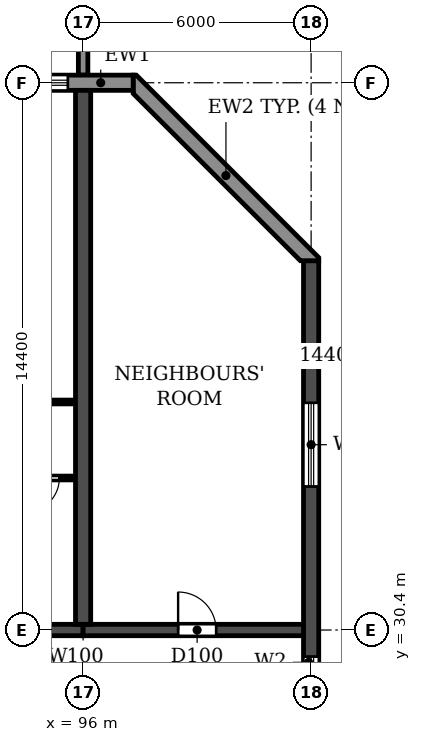
"""IFC4 building model, lengths in metres.
Left out: names, types, materials, properties, quantities, classifications, styles, units other than length and angle.
Written with IfcOpenShell. Run it as: python <this file> out.ifc"""

import sys

from ifc_helpers import new_model, si_unit, direction, frame, frame_2d, origin, place, context, subcontext, project, spatial, polyline, rectangle, outline, extrude, source, transform, mapped, element, fill, save


model = new_model("IFC4")
c1 = context("Model", 3, precision=1e-05, world=origin(), true_north=direction((0.0, 1.0)))
c2 = subcontext(c1, "Body", "Model", "MODEL_VIEW")
j1 = project(units=[si_unit("LENGTHUNIT", "METRE"), si_unit("PLANEANGLEUNIT", "RADIAN")], contexts=[c1])
p1 = place(None, origin())
s1 = spatial("IfcSite", under=j1, at=p1, CompositionType="ELEMENT")
p2 = place(p1, origin())
s2 = spatial("IfcBuilding", under=s1, at=p2, CompositionType="ELEMENT")
p3 = place(p2, frame((0.0, 0.0, 26.7)))
s3 = spatial("IfcBuildingStorey", under=s2, at=p3, CompositionType="ELEMENT", Elevation=26.7)
p4 = place(p3, frame((96.0, 30.55, 0.0), z_axis=(0.0, 0.0, 1.0), x_axis=(0.0, 1.0, 0.0)))
e1 = element("IfcWall", 1, at=p4, inside=s3, PredefinedType="SHEAR", context=c2, shape_type="SweptSolid", body=[
    extrude(rectangle(XDim=14.05, YDim=0.4, at=frame_2d((7.025, 0.0))), origin(), (0.0, 0.0, 1.0), 3.05),
])
p5 = place(p3, frame((102.0, 4.683, 0.0), z_axis=(0.0, 0.0, 1.0), x_axis=(0.0, 1.0, 0.0)))
e2 = element("IfcWall", 2, at=p5, inside=s3, PredefinedType="SHEAR", context=c2, shape_type="SweptSolid", body=[
    extrude(rectangle(XDim=35.434, YDim=0.4, at=frame_2d((17.717, 0.0))), origin(), (0.0, 0.0, 1.0), 3.05),
])
p6 = place(p5, frame((15.917, 0.0, 0.9)))
e3 = element("IfcOpeningElement", 3, at=p6, cuts=e2, PredefinedType="OPENING", context=c2, shape_type="SweptSolid", body=[
    extrude(rectangle(XDim=1.2, YDim=1.5, at=frame_2d((0.6, 0.75))), frame((0.0, 0.21, 0.0), z_axis=(0.0, -1.0, 0.0), x_axis=(1.0, 0.0, 0.0)), (0.0, 0.0, 1.0), 0.42),
])
p7 = place(p5, frame((23.817, 0.0, 0.9)))
e4 = element("IfcOpeningElement", 4, at=p7, cuts=e2, PredefinedType="OPENING", context=c2, shape_type="SweptSolid", body=[
    extrude(rectangle(XDim=1.2, YDim=1.5, at=frame_2d((0.6, 0.75))), frame((0.0, 0.21, 0.0), z_axis=(0.0, -1.0, 0.0), x_axis=(1.0, 0.0, 0.0)), (0.0, 0.0, 1.0), 0.42),
])
p8 = place(p5, frame((8.017, 0.0, 0.9)))
e5 = element("IfcOpeningElement", 5, at=p8, cuts=e2, PredefinedType="OPENING", context=c2, shape_type="SweptSolid", body=[
    extrude(rectangle(XDim=1.2, YDim=1.5, at=frame_2d((0.6, 0.75))), frame((0.0, 0.21, 0.0), z_axis=(0.0, -1.0, 0.0), x_axis=(1.0, 0.0, 0.0)), (0.0, 0.0, 1.0), 0.42),
])
p9 = place(p5, frame((29.493, 0.0, 0.6)))
e6 = element("IfcOpeningElement", 6, at=p9, cuts=e2, PredefinedType="OPENING", context=c2, shape_type="SweptSolid", body=[
    extrude(rectangle(XDim=2.2, YDim=1.8, at=frame_2d((1.1, 0.9))), frame((0.0, 0.21, 0.0), z_axis=(0.0, -1.0, 0.0), x_axis=(1.0, 0.0, 0.0)), (0.0, 0.0, 1.0), 0.42),
])
p10 = place(p5, frame((2.541, 0.0, 0.6)))
e7 = element("IfcOpeningElement", 7, at=p10, cuts=e2, PredefinedType="OPENING", context=c2, shape_type="SweptSolid", body=[
    extrude(rectangle(XDim=2.2, YDim=1.8, at=frame_2d((1.1, 0.9))), frame((0.0, 0.21, 0.0), z_axis=(0.0, -1.0, 0.0), x_axis=(1.0, 0.0, 0.0)), (0.0, 0.0, 1.0), 0.42),
])
p11 = place(p3, frame((90.0, 30.4, 0.0), z_axis=(0.0, 0.0, 1.0), x_axis=(1.0, 0.0, 0.0)))
e8 = element("IfcWall", 8, at=p11, inside=s3, PredefinedType="SHEAR", context=c2, shape_type="SweptSolid", body=[
    extrude(rectangle(XDim=6.0, YDim=0.3, at=frame_2d((3.0, 0.0))), origin(), (0.0, 0.0, 1.0), 2.45),
])
p12 = place(p11, frame((2.45, 0.0, 0.0)))
e9 = element("IfcOpeningElement", 9, at=p12, cuts=e8, PredefinedType="OPENING", context=c2, shape_type="SweptSolid", body=[
    extrude(rectangle(XDim=1.0, YDim=2.1, at=frame_2d((0.5, 1.05))), frame((0.0, 0.16, 0.0), z_axis=(0.0, -1.0, 0.0), x_axis=(1.0, 0.0, 0.0)), (0.0, 0.0, 1.0), 0.32),
])
p13 = place(p3, frame((96.0, 30.4, 0.0), z_axis=(0.0, 0.0, 1.0), x_axis=(1.0, 0.0, 0.0)))
e10 = element("IfcWall", 10, at=p13, inside=s3, PredefinedType="SHEAR", context=c2, shape_type="SweptSolid", body=[
    extrude(rectangle(XDim=5.8, YDim=0.3, at=frame_2d((2.9, 0.0))), origin(), (0.0, 0.0, 1.0), 2.45),
])
p14 = place(p13, frame((2.5, 0.0, 0.0)))
e11 = element("IfcOpeningElement", 11, at=p14, cuts=e10, PredefinedType="OPENING", context=c2, shape_type="SweptSolid", body=[
    extrude(rectangle(XDim=1.0, YDim=2.1, at=frame_2d((0.5, 1.05))), frame((0.0, 0.16, 0.0), z_axis=(0.0, -1.0, 0.0), x_axis=(1.0, 0.0, 0.0)), (0.0, 0.0, 1.0), 0.32),
])
p15 = place(p3, origin())
e12 = element("IfcWall", 12, at=p15, inside=s3, PredefinedType="STANDARD", context=c2, shape_type="SweptSolid", body=[
    extrude(outline(polyline([(102.2, 40.117), (102.2, 40.2), (97.4, 45.0), (97.317, 45.0), (97.317, 44.517), (101.717, 40.117), (102.2, 40.117)])), origin(), (0.0, 0.0, 1.0), 3.05),
])
p16 = place(p3, frame((97.317, 44.8, 0.0), z_axis=(0.0, 0.0, 1.0), x_axis=(-1.0, 0.0, 0.0)))
e13 = element("IfcWall", 13, at=p16, inside=s3, PredefinedType="STANDARD", context=c2, shape_type="SweptSolid", body=[
    extrude(rectangle(XDim=92.634, YDim=0.4, at=frame_2d((46.317, 0.0))), origin(), (0.0, 0.0, 1.0), 3.05),
])
p17 = place(p16, frame((88.717, 0.0, 0.9)))
e14 = element("IfcOpeningElement", 14, at=p17, cuts=e13, PredefinedType="OPENING", context=c2, shape_type="SweptSolid", body=[
    extrude(rectangle(XDim=2.2, YDim=1.5, at=frame_2d((1.1, 0.75))), frame((0.0, 0.21, 0.0), z_axis=(0.0, -1.0, 0.0), x_axis=(1.0, 0.0, 0.0)), (0.0, 0.0, 1.0), 0.42),
])
p18 = place(p16, frame((85.917, 0.0, 0.0)))
e15 = element("IfcOpeningElement", 15, at=p18, cuts=e13, PredefinedType="OPENING", context=c2, shape_type="SweptSolid", body=[
    extrude(rectangle(XDim=1.8, YDim=2.4, at=frame_2d((0.9, 1.2))), frame((0.0, 0.21, 0.0), z_axis=(0.0, -1.0, 0.0), x_axis=(1.0, 0.0, 0.0)), (0.0, 0.0, 1.0), 0.42),
])
p19 = place(p16, frame((82.717, 0.0, 0.9)))
e16 = element("IfcOpeningElement", 16, at=p19, cuts=e13, PredefinedType="OPENING", context=c2, shape_type="SweptSolid", body=[
    extrude(rectangle(XDim=2.2, YDim=1.5, at=frame_2d((1.1, 0.75))), frame((0.0, 0.21, 0.0), z_axis=(0.0, -1.0, 0.0), x_axis=(1.0, 0.0, 0.0)), (0.0, 0.0, 1.0), 0.42),
])
p20 = place(p16, frame((79.717, 0.0, 0.9)))
e17 = element("IfcOpeningElement", 17, at=p20, cuts=e13, PredefinedType="OPENING", context=c2, shape_type="SweptSolid", body=[
    extrude(rectangle(XDim=2.2, YDim=1.5, at=frame_2d((1.1, 0.75))), frame((0.0, 0.21, 0.0), z_axis=(0.0, -1.0, 0.0), x_axis=(1.0, 0.0, 0.0)), (0.0, 0.0, 1.0), 0.42),
])
p21 = place(p16, frame((76.917, 0.0, 0.0)))
e18 = element("IfcOpeningElement", 18, at=p21, cuts=e13, PredefinedType="OPENING", context=c2, shape_type="SweptSolid", body=[
    extrude(rectangle(XDim=1.8, YDim=2.4, at=frame_2d((0.9, 1.2))), frame((0.0, 0.21, 0.0), z_axis=(0.0, -1.0, 0.0), x_axis=(1.0, 0.0, 0.0)), (0.0, 0.0, 1.0), 0.42),
])
p22 = place(p16, frame((73.717, 0.0, 0.9)))
e19 = element("IfcOpeningElement", 19, at=p22, cuts=e13, PredefinedType="OPENING", context=c2, shape_type="SweptSolid", body=[
    extrude(rectangle(XDim=2.2, YDim=1.5, at=frame_2d((1.1, 0.75))), frame((0.0, 0.21, 0.0), z_axis=(0.0, -1.0, 0.0), x_axis=(1.0, 0.0, 0.0)), (0.0, 0.0, 1.0), 0.42),
])
p23 = place(p16, frame((70.717, 0.0, 0.9)))
e20 = element("IfcOpeningElement", 20, at=p23, cuts=e13, PredefinedType="OPENING", context=c2, shape_type="SweptSolid", body=[
    extrude(rectangle(XDim=2.2, YDim=1.5, at=frame_2d((1.1, 0.75))), frame((0.0, 0.21, 0.0), z_axis=(0.0, -1.0, 0.0), x_axis=(1.0, 0.0, 0.0)), (0.0, 0.0, 1.0), 0.42),
])
p24 = place(p16, frame((67.717, 0.0, 0.9)))
e21 = element("IfcOpeningElement", 21, at=p24, cuts=e13, PredefinedType="OPENING", context=c2, shape_type="SweptSolid", body=[
    extrude(rectangle(XDim=2.2, YDim=1.5, at=frame_2d((1.1, 0.75))), frame((0.0, 0.21, 0.0), z_axis=(0.0, -1.0, 0.0), x_axis=(1.0, 0.0, 0.0)), (0.0, 0.0, 1.0), 0.42),
])
p25 = place(p16, frame((64.917, 0.0, 0.0)))
e22 = element("IfcOpeningElement", 22, at=p25, cuts=e13, PredefinedType="OPENING", context=c2, shape_type="SweptSolid", body=[
    extrude(rectangle(XDim=1.8, YDim=2.4, at=frame_2d((0.9, 1.2))), frame((0.0, 0.21, 0.0), z_axis=(0.0, -1.0, 0.0), x_axis=(1.0, 0.0, 0.0)), (0.0, 0.0, 1.0), 0.42),
])
p26 = place(p16, frame((61.717, 0.0, 0.9)))
e23 = element("IfcOpeningElement", 23, at=p26, cuts=e13, PredefinedType="OPENING", context=c2, shape_type="SweptSolid", body=[
    extrude(rectangle(XDim=2.2, YDim=1.5, at=frame_2d((1.1, 0.75))), frame((0.0, 0.21, 0.0), z_axis=(0.0, -1.0, 0.0), x_axis=(1.0, 0.0, 0.0)), (0.0, 0.0, 1.0), 0.42),
])
p27 = place(p16, frame((58.717, 0.0, 0.9)))
e24 = element("IfcOpeningElement", 24, at=p27, cuts=e13, PredefinedType="OPENING", context=c2, shape_type="SweptSolid", body=[
    extrude(rectangle(XDim=2.2, YDim=1.5, at=frame_2d((1.1, 0.75))), frame((0.0, 0.21, 0.0), z_axis=(0.0, -1.0, 0.0), x_axis=(1.0, 0.0, 0.0)), (0.0, 0.0, 1.0), 0.42),
])
p28 = place(p16, frame((55.917, 0.0, 0.0)))
e25 = element("IfcOpeningElement", 25, at=p28, cuts=e13, PredefinedType="OPENING", context=c2, shape_type="SweptSolid", body=[
    extrude(rectangle(XDim=1.8, YDim=2.4, at=frame_2d((0.9, 1.2))), frame((0.0, 0.21, 0.0), z_axis=(0.0, -1.0, 0.0), x_axis=(1.0, 0.0, 0.0)), (0.0, 0.0, 1.0), 0.42),
])
p29 = place(p16, frame((52.917, 0.0, 0.0)))
e26 = element("IfcOpeningElement", 26, at=p29, cuts=e13, PredefinedType="OPENING", context=c2, shape_type="SweptSolid", body=[
    extrude(rectangle(XDim=1.8, YDim=2.4, at=frame_2d((0.9, 1.2))), frame((0.0, 0.21, 0.0), z_axis=(0.0, -1.0, 0.0), x_axis=(1.0, 0.0, 0.0)), (0.0, 0.0, 1.0), 0.42),
])
p30 = place(p16, frame((49.717, 0.0, 0.9)))
e27 = element("IfcOpeningElement", 27, at=p30, cuts=e13, PredefinedType="OPENING", context=c2, shape_type="SweptSolid", body=[
    extrude(rectangle(XDim=2.2, YDim=1.5, at=frame_2d((1.1, 0.75))), frame((0.0, 0.21, 0.0), z_axis=(0.0, -1.0, 0.0), x_axis=(1.0, 0.0, 0.0)), (0.0, 0.0, 1.0), 0.42),
])
p31 = place(p16, frame((46.917, 0.0, 0.0)))
e28 = element("IfcOpeningElement", 28, at=p31, cuts=e13, PredefinedType="OPENING", context=c2, shape_type="SweptSolid", body=[
    extrude(rectangle(XDim=1.8, YDim=2.4, at=frame_2d((0.9, 1.2))), frame((0.0, 0.21, 0.0), z_axis=(0.0, -1.0, 0.0), x_axis=(1.0, 0.0, 0.0)), (0.0, 0.0, 1.0), 0.42),
])
p32 = place(p16, frame((43.717, 0.0, 0.9)))
e29 = element("IfcOpeningElement", 29, at=p32, cuts=e13, PredefinedType="OPENING", context=c2, shape_type="SweptSolid", body=[
    extrude(rectangle(XDim=2.2, YDim=1.5, at=frame_2d((1.1, 0.75))), frame((0.0, 0.21, 0.0), z_axis=(0.0, -1.0, 0.0), x_axis=(1.0, 0.0, 0.0)), (0.0, 0.0, 1.0), 0.42),
])
p33 = place(p16, frame((40.717, 0.0, 0.9)))
e30 = element("IfcOpeningElement", 30, at=p33, cuts=e13, PredefinedType="OPENING", context=c2, shape_type="SweptSolid", body=[
    extrude(rectangle(XDim=2.2, YDim=1.5, at=frame_2d((1.1, 0.75))), frame((0.0, 0.21, 0.0), z_axis=(0.0, -1.0, 0.0), x_axis=(1.0, 0.0, 0.0)), (0.0, 0.0, 1.0), 0.42),
])
p34 = place(p16, frame((37.917, 0.0, 0.0)))
e31 = element("IfcOpeningElement", 31, at=p34, cuts=e13, PredefinedType="OPENING", context=c2, shape_type="SweptSolid", body=[
    extrude(rectangle(XDim=1.8, YDim=2.4, at=frame_2d((0.9, 1.2))), frame((0.0, 0.21, 0.0), z_axis=(0.0, -1.0, 0.0), x_axis=(1.0, 0.0, 0.0)), (0.0, 0.0, 1.0), 0.42),
])
p35 = place(p16, frame((34.917, 0.0, 0.0)))
e32 = element("IfcOpeningElement", 32, at=p35, cuts=e13, PredefinedType="OPENING", context=c2, shape_type="SweptSolid", body=[
    extrude(rectangle(XDim=1.8, YDim=2.4, at=frame_2d((0.9, 1.2))), frame((0.0, 0.21, 0.0), z_axis=(0.0, -1.0, 0.0), x_axis=(1.0, 0.0, 0.0)), (0.0, 0.0, 1.0), 0.42),
])
p36 = place(p16, frame((31.717, 0.0, 0.9)))
e33 = element("IfcOpeningElement", 33, at=p36, cuts=e13, PredefinedType="OPENING", context=c2, shape_type="SweptSolid", body=[
    extrude(rectangle(XDim=2.2, YDim=1.5, at=frame_2d((1.1, 0.75))), frame((0.0, 0.21, 0.0), z_axis=(0.0, -1.0, 0.0), x_axis=(1.0, 0.0, 0.0)), (0.0, 0.0, 1.0), 0.42),
])
p37 = place(p16, frame((28.717, 0.0, 0.9)))
e34 = element("IfcOpeningElement", 34, at=p37, cuts=e13, PredefinedType="OPENING", context=c2, shape_type="SweptSolid", body=[
    extrude(rectangle(XDim=2.2, YDim=1.5, at=frame_2d((1.1, 0.75))), frame((0.0, 0.21, 0.0), z_axis=(0.0, -1.0, 0.0), x_axis=(1.0, 0.0, 0.0)), (0.0, 0.0, 1.0), 0.42),
])
p38 = place(p16, frame((25.717, 0.0, 0.9)))
e35 = element("IfcOpeningElement", 35, at=p38, cuts=e13, PredefinedType="OPENING", context=c2, shape_type="SweptSolid", body=[
    extrude(rectangle(XDim=2.2, YDim=1.5, at=frame_2d((1.1, 0.75))), frame((0.0, 0.21, 0.0), z_axis=(0.0, -1.0, 0.0), x_axis=(1.0, 0.0, 0.0)), (0.0, 0.0, 1.0), 0.42),
])
p39 = place(p16, frame((22.717, 0.0, 0.9)))
e36 = element("IfcOpeningElement", 36, at=p39, cuts=e13, PredefinedType="OPENING", context=c2, shape_type="SweptSolid", body=[
    extrude(rectangle(XDim=2.2, YDim=1.5, at=frame_2d((1.1, 0.75))), frame((0.0, 0.21, 0.0), z_axis=(0.0, -1.0, 0.0), x_axis=(1.0, 0.0, 0.0)), (0.0, 0.0, 1.0), 0.42),
])
p40 = place(p16, frame((19.917, 0.0, 0.0)))
e37 = element("IfcOpeningElement", 37, at=p40, cuts=e13, PredefinedType="OPENING", context=c2, shape_type="SweptSolid", body=[
    extrude(rectangle(XDim=1.8, YDim=2.4, at=frame_2d((0.9, 1.2))), frame((0.0, 0.21, 0.0), z_axis=(0.0, -1.0, 0.0), x_axis=(1.0, 0.0, 0.0)), (0.0, 0.0, 1.0), 0.42),
])
p41 = place(p16, frame((16.717, 0.0, 0.9)))
e38 = element("IfcOpeningElement", 38, at=p41, cuts=e13, PredefinedType="OPENING", context=c2, shape_type="SweptSolid", body=[
    extrude(rectangle(XDim=2.2, YDim=1.5, at=frame_2d((1.1, 0.75))), frame((0.0, 0.21, 0.0), z_axis=(0.0, -1.0, 0.0), x_axis=(1.0, 0.0, 0.0)), (0.0, 0.0, 1.0), 0.42),
])
p42 = place(p16, frame((13.717, 0.0, 0.9)))
e39 = element("IfcOpeningElement", 39, at=p42, cuts=e13, PredefinedType="OPENING", context=c2, shape_type="SweptSolid", body=[
    extrude(rectangle(XDim=2.2, YDim=1.5, at=frame_2d((1.1, 0.75))), frame((0.0, 0.21, 0.0), z_axis=(0.0, -1.0, 0.0), x_axis=(1.0, 0.0, 0.0)), (0.0, 0.0, 1.0), 0.42),
])
p43 = place(p16, frame((10.717, 0.0, 0.9)))
e40 = element("IfcOpeningElement", 40, at=p43, cuts=e13, PredefinedType="OPENING", context=c2, shape_type="SweptSolid", body=[
    extrude(rectangle(XDim=2.2, YDim=1.5, at=frame_2d((1.1, 0.75))), frame((0.0, 0.21, 0.0), z_axis=(0.0, -1.0, 0.0), x_axis=(1.0, 0.0, 0.0)), (0.0, 0.0, 1.0), 0.42),
])
p44 = place(p16, frame((7.917, 0.0, 0.0)))
e41 = element("IfcOpeningElement", 41, at=p44, cuts=e13, PredefinedType="OPENING", context=c2, shape_type="SweptSolid", body=[
    extrude(rectangle(XDim=1.8, YDim=2.4, at=frame_2d((0.9, 1.2))), frame((0.0, 0.21, 0.0), z_axis=(0.0, -1.0, 0.0), x_axis=(1.0, 0.0, 0.0)), (0.0, 0.0, 1.0), 0.42),
])
p45 = place(p16, frame((4.917, 0.0, 0.0)))
e42 = element("IfcOpeningElement", 42, at=p45, cuts=e13, PredefinedType="OPENING", context=c2, shape_type="SweptSolid", body=[
    extrude(rectangle(XDim=1.8, YDim=2.4, at=frame_2d((0.9, 1.2))), frame((0.0, 0.21, 0.0), z_axis=(0.0, -1.0, 0.0), x_axis=(1.0, 0.0, 0.0)), (0.0, 0.0, 1.0), 0.42),
])
p46 = place(p16, frame((1.717, 0.0, 0.9)))
e43 = element("IfcOpeningElement", 43, at=p46, cuts=e13, PredefinedType="OPENING", context=c2, shape_type="SweptSolid", body=[
    extrude(rectangle(XDim=2.2, YDim=1.5, at=frame_2d((1.1, 0.75))), frame((0.0, 0.21, 0.0), z_axis=(0.0, -1.0, 0.0), x_axis=(1.0, 0.0, 0.0)), (0.0, 0.0, 1.0), 0.42),
])
m1 = source(origin(), c2, "Body", "SweptSolid", [
    extrude(outline(polyline([(0.0, 0.0), (0.25, 0.0), (0.25, 3.1), (0.0, 3.1), (0.0, 0.0)])), origin(), (0.0, 0.0, 1.0), 3.1),
])
p47 = place(p3, frame((95.875, 45.0, 0.0)))
e44 = element("IfcWall", 44, at=p47, inside=s3, PredefinedType="STANDARD", context=c2, shape_type="MappedRepresentation", body=[
    mapped(m1, transform((0.0, 0.0, 0.0))),
])
p48 = place(p3, frame((93.8, 34.4, 0.0), z_axis=(0.0, 0.0, 1.0), x_axis=(1.0, 0.0, 0.0)))
e45 = element("IfcWall", 45, at=p48, inside=s3, PredefinedType="PARTITIONING", context=c2, shape_type="SweptSolid", body=[
    extrude(rectangle(XDim=1.99, YDim=0.1, at=frame_2d((0.995, 0.0))), origin(), (0.0, 0.0, 1.0), 3.05),
])
p49 = place(p48, frame((0.675, 0.0, 0.0)))
e46 = element("IfcOpeningElement", 46, at=p49, cuts=e45, PredefinedType="OPENING", context=c2, shape_type="SweptSolid", body=[
    extrude(rectangle(XDim=0.9, YDim=2.1, at=frame_2d((0.45, 1.05))), frame((0.0, 0.06, 0.0), z_axis=(0.0, -1.0, 0.0), x_axis=(1.0, 0.0, 0.0)), (0.0, 0.0, 1.0), 0.12),
])
p50 = place(p3, frame((92.95, 36.4, 0.0), z_axis=(0.0, 0.0, 1.0), x_axis=(1.0, 0.0, 0.0)))
e47 = element("IfcWall", 47, at=p50, inside=s3, PredefinedType="PARTITIONING", context=c2, shape_type="SweptSolid", body=[
    extrude(rectangle(XDim=2.84, YDim=0.1, at=frame_2d((1.42, 0.0))), origin(), (0.0, 0.0, 1.0), 3.05),
])
p51 = place(p50, frame((0.55, 0.0, 0.0)))
e48 = element("IfcOpeningElement", 48, at=p51, cuts=e47, PredefinedType="OPENING", context=c2, shape_type="SweptSolid", body=[
    extrude(rectangle(XDim=0.9, YDim=2.1, at=frame_2d((0.45, 1.05))), frame((0.0, 0.06, 0.0), z_axis=(0.0, -1.0, 0.0), x_axis=(1.0, 0.0, 0.0)), (0.0, 0.0, 1.0), 0.12),
])
p52 = place(p7, origin())
e49 = element("IfcWindow", 49, at=p52, inside=s3, PartitioningType="SINGLE_PANEL", PredefinedType="WINDOW", context=c2, shape_type="SweptSolid", body=[
    extrude(rectangle(XDim=1.2, YDim=1.5, at=frame_2d((0.6, 0.75))), frame((0.0, 0.03, 0.0), z_axis=(0.0, -1.0, 0.0), x_axis=(1.0, 0.0, 0.0)), (0.0, 0.0, 1.0), 0.06),
])
fill(e4, e49)
p53 = place(p9, origin())
e50 = element("IfcWindow", 50, at=p53, inside=s3, PartitioningType="DOUBLE_PANEL_HORIZONTAL", PredefinedType="WINDOW", context=c2, shape_type="SweptSolid", body=[
    extrude(rectangle(XDim=2.2, YDim=1.8, at=frame_2d((1.1, 0.9))), frame((0.0, 0.03, 0.0), z_axis=(0.0, -1.0, 0.0), x_axis=(1.0, 0.0, 0.0)), (0.0, 0.0, 1.0), 0.06),
])
fill(e6, e50)
p54 = place(p46, origin())
e51 = element("IfcWindow", 51, at=p54, inside=s3, PartitioningType="DOUBLE_PANEL_HORIZONTAL", PredefinedType="WINDOW", context=c2, shape_type="SweptSolid", body=[
    extrude(rectangle(XDim=2.2, YDim=1.5, at=frame_2d((1.1, 0.75))), frame((0.0, 0.03, 0.0), z_axis=(0.0, -1.0, 0.0), x_axis=(1.0, 0.0, 0.0)), (0.0, 0.0, 1.0), 0.06),
])
fill(e43, e51)
p55 = place(p49, frame((0.9, 0.0, 0.0), z_axis=(0.0, 0.0, 1.0), x_axis=(-1.0, 0.0, 0.0)))
e52 = element("IfcDoor", 52, at=p55, inside=s3, OperationType="SINGLE_SWING_RIGHT", PredefinedType="DOOR", context=c2, shape_type="SweptSolid", body=[
    extrude(rectangle(XDim=0.9, YDim=2.1, at=frame_2d((0.45, 1.05))), frame((0.0, 0.025, 0.0), z_axis=(0.0, -1.0, 0.0), x_axis=(1.0, 0.0, 0.0)), (0.0, 0.0, 1.0), 0.05),
])
fill(e46, e52)
p56 = place(p14, origin())
e53 = element("IfcDoor", 53, at=p56, inside=s3, OperationType="SINGLE_SWING_LEFT", PredefinedType="DOOR", context=c2, shape_type="SweptSolid", body=[
    extrude(rectangle(XDim=1.0, YDim=2.1, at=frame_2d((0.5, 1.05))), frame((0.0, 0.025, 0.0), z_axis=(0.0, -1.0, 0.0), x_axis=(1.0, 0.0, 0.0)), (0.0, 0.0, 1.0), 0.05),
])
fill(e11, e53)
save(model, sys.argv[1])
